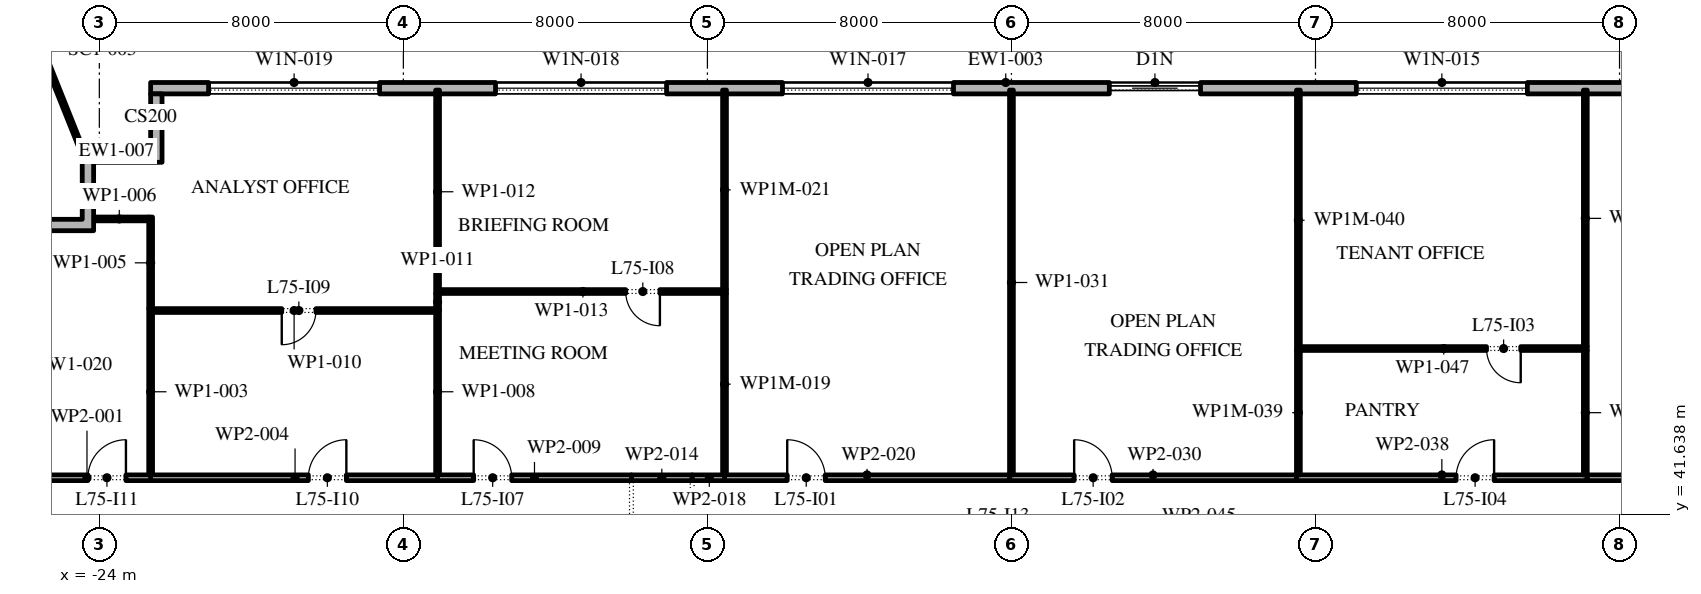
"""IFC4 building model, lengths in metres.
Left out: names, types, materials, properties, quantities, classifications, styles, units other than length and angle.
Written with IfcOpenShell. Run it as: python <this file> out.ifc"""

import sys

from ifc_helpers import new_model, si_unit, direction, frame, frame_2d, origin, place, context, subcontext, project, spatial, polyline, rectangle, outline, extrude, element, fill, save


model = new_model("IFC4")
c1 = context("Model", 3, precision=1e-05, world=origin(), true_north=direction((0.0, 1.0)))
c2 = subcontext(c1, "Body", "Model", "MODEL_VIEW")
j1 = project(units=[si_unit("LENGTHUNIT", "METRE"), si_unit("PLANEANGLEUNIT", "RADIAN")], contexts=[c1])
p1 = place(None, origin())
s1 = spatial("IfcSite", under=j1, at=p1, CompositionType="ELEMENT")
p2 = place(p1, origin())
s2 = spatial("IfcBuilding", under=s1, at=p2, CompositionType="ELEMENT")
p3 = place(p2, frame((0.0, 0.0, 342.6)))
s3 = spatial("IfcBuildingStorey", under=s2, at=p3, CompositionType="ELEMENT", Elevation=342.6)
p4 = place(p3, frame((22.35, 52.85, 0.0), z_axis=(0.0, 0.0, 1.0), x_axis=(-1.0, 0.0, 0.0)))
e1 = element("IfcWall", 1, at=p4, inside=s3, PredefinedType="STANDARD", context=c2, shape_type="SweptSolid", body=[
    extrude(rectangle(XDim=45.0, YDim=0.3, at=frame_2d((22.5, 0.0))), origin(), (0.0, 0.0, 1.0), 4.0),
])
p5 = place(p4, frame((1.375, 0.0, 0.45)))
e2 = element("IfcOpeningElement", 2, at=p5, cuts=e1, PredefinedType="OPENING", context=c2, shape_type="SweptSolid", body=[
    extrude(rectangle(XDim=4.5, YDim=2.525, at=frame_2d((2.25, 1.262))), frame((0.0, 0.16, 0.0), z_axis=(0.0, -1.0, 0.0), x_axis=(1.0, 0.0, 0.0)), (0.0, 0.0, 1.0), 0.32),
])
p6 = place(p4, frame((8.775, 0.0, 0.45)))
e3 = element("IfcOpeningElement", 3, at=p6, cuts=e1, PredefinedType="OPENING", context=c2, shape_type="SweptSolid", body=[
    extrude(rectangle(XDim=4.5, YDim=2.525, at=frame_2d((2.25, 1.262))), frame((0.0, 0.16, 0.0), z_axis=(0.0, -1.0, 0.0), x_axis=(1.0, 0.0, 0.0)), (0.0, 0.0, 1.0), 0.32),
])
p7 = place(p4, frame((17.375, 0.0, 0.0)))
e4 = element("IfcOpeningElement", 4, at=p7, cuts=e1, PredefinedType="OPENING", context=c2, shape_type="SweptSolid", body=[
    extrude(rectangle(XDim=2.4, YDim=2.975, at=frame_2d((1.2, 1.488))), frame((0.0, 0.16, 0.0), z_axis=(0.0, -1.0, 0.0), x_axis=(1.0, 0.0, 0.0)), (0.0, 0.0, 1.0), 0.32),
])
p8 = place(p4, frame((23.875, 0.0, 0.45)))
e5 = element("IfcOpeningElement", 5, at=p8, cuts=e1, PredefinedType="OPENING", context=c2, shape_type="SweptSolid", body=[
    extrude(rectangle(XDim=4.5, YDim=2.525, at=frame_2d((2.25, 1.262))), frame((0.0, 0.16, 0.0), z_axis=(0.0, -1.0, 0.0), x_axis=(1.0, 0.0, 0.0)), (0.0, 0.0, 1.0), 0.32),
])
p9 = place(p4, frame((31.425, 0.0, 0.45)))
e6 = element("IfcOpeningElement", 6, at=p9, cuts=e1, PredefinedType="OPENING", context=c2, shape_type="SweptSolid", body=[
    extrude(rectangle(XDim=4.5, YDim=2.525, at=frame_2d((2.25, 1.262))), frame((0.0, 0.16, 0.0), z_axis=(0.0, -1.0, 0.0), x_axis=(1.0, 0.0, 0.0)), (0.0, 0.0, 1.0), 0.32),
])
p10 = place(p4, frame((38.975, 0.0, 0.45)))
e7 = element("IfcOpeningElement", 7, at=p10, cuts=e1, PredefinedType="OPENING", context=c2, shape_type="SweptSolid", body=[
    extrude(rectangle(XDim=4.5, YDim=2.525, at=frame_2d((2.25, 1.262))), frame((0.0, 0.16, 0.0), z_axis=(0.0, -1.0, 0.0), x_axis=(1.0, 0.0, 0.0)), (0.0, 0.0, 1.0), 0.32),
])
p11 = place(p3, origin())
e8 = element("IfcWall", 8, at=p11, inside=s3, PredefinedType="STANDARD", context=c2, shape_type="SweptSolid", body=[
    extrude(outline(polyline([(-24.45, 49.4), (-24.45, 51.2), (-22.65, 51.2), (-22.65, 52.7), (-22.35, 52.7), (-22.35, 50.9), (-24.15, 50.9), (-24.15, 49.1), (-26.25, 49.1), (-26.25, 49.4), (-24.45, 49.4)])), origin(), (0.0, 0.0, 1.0), 4.0),
])
p12 = place(p3, frame((-24.45, 51.2, -0.05), z_axis=(0.0, 0.0, 1.0), x_axis=(-0.371412694589, 0.928467883288, 0.0)))
e9 = element("IfcWall", 9, at=p12, inside=s3, PredefinedType="STANDARD", context=c2, shape_type="SweptSolid", body=[
    extrude(rectangle(XDim=5.735, YDim=0.1, at=frame_2d((2.868, 0.0))), origin(), (0.0, 0.0, 1.0), 4.05),
])
p13 = place(p3, frame((-26.05, 42.6, 0.0), z_axis=(0.0, 0.0, 1.0), x_axis=(1.0, 0.0, 0.0)))
e10 = element("IfcWall", 10, at=p13, inside=s3, PredefinedType="PARTITIONING", context=c2, shape_type="SweptSolid", body=[
    extrude(rectangle(XDim=3.45, YDim=0.15, at=frame_2d((1.725, 0.0))), origin(), (0.0, 0.0, 1.0), 4.0),
])
p14 = place(p13, frame((1.75, 0.0, 0.0)))
e11 = element("IfcOpeningElement", 11, at=p14, cuts=e10, PredefinedType="OPENING", context=c2, shape_type="SweptSolid", body=[
    extrude(rectangle(XDim=1.0, YDim=2.1, at=frame_2d((0.5, 1.05))), frame((0.0, 0.085, 0.0), z_axis=(0.0, -1.0, 0.0), x_axis=(1.0, 0.0, 0.0)), (0.0, 0.0, 1.0), 0.17),
])
p15 = place(p3, frame((-22.65, 42.675, 0.0), z_axis=(0.0, 0.0, 1.0), x_axis=(0.0, 1.0, 0.0)))
e12 = element("IfcWall", 12, at=p15, inside=s3, PredefinedType="PARTITIONING", context=c2, shape_type="SweptSolid", body=[
    extrude(rectangle(XDim=4.375, YDim=0.1, at=frame_2d((2.188, 0.0))), origin(), (0.0, 0.0, 1.0), 4.0),
])
p16 = place(p3, frame((-22.65, 42.6, 0.0), z_axis=(0.0, 0.0, 1.0), x_axis=(1.0, 0.0, 0.0)))
e13 = element("IfcWall", 13, at=p16, inside=s3, PredefinedType="PARTITIONING", context=c2, shape_type="SweptSolid", body=[
    extrude(rectangle(XDim=7.6, YDim=0.15, at=frame_2d((3.8, 0.0))), origin(), (0.0, 0.0, 1.0), 4.0),
])
p17 = place(p16, frame((4.15, 0.0, 0.0)))
e14 = element("IfcOpeningElement", 14, at=p17, cuts=e13, PredefinedType="OPENING", context=c2, shape_type="SweptSolid", body=[
    extrude(rectangle(XDim=1.0, YDim=2.1, at=frame_2d((0.5, 1.05))), frame((0.0, 0.085, 0.0), z_axis=(0.0, -1.0, 0.0), x_axis=(1.0, 0.0, 0.0)), (0.0, 0.0, 1.0), 0.17),
])
p18 = place(p3, frame((-22.65, 47.05, 0.0), z_axis=(0.0, 0.0, 1.0), x_axis=(0.0, 1.0, 0.0)))
e15 = element("IfcWall", 15, at=p18, inside=s3, PredefinedType="PARTITIONING", context=c2, shape_type="SweptSolid", body=[
    extrude(rectangle(XDim=2.41, YDim=0.1, at=frame_2d((1.205, 0.0))), origin(), (0.0, 0.0, 1.0), 4.0),
])
p19 = place(p3, frame((-22.7, 49.41, 0.0), z_axis=(0.0, 0.0, 1.0), x_axis=(-1.0, 0.0, 0.0)))
e16 = element("IfcWall", 16, at=p19, inside=s3, PredefinedType="PARTITIONING", context=c2, shape_type="SweptSolid", body=[
    extrude(rectangle(XDim=1.55, YDim=0.1, at=frame_2d((0.775, 0.0))), origin(), (0.0, 0.0, 1.0), 4.0),
])
p20 = place(p3, frame((-15.1, 42.675, 0.0), z_axis=(0.0, 0.0, 1.0), x_axis=(0.0, 1.0, 0.0)))
e17 = element("IfcWall", 17, at=p20, inside=s3, PredefinedType="PARTITIONING", context=c2, shape_type="SweptSolid", body=[
    extrude(rectangle(XDim=4.375, YDim=0.1, at=frame_2d((2.188, 0.0))), origin(), (0.0, 0.0, 1.0), 4.0),
])
p21 = place(p3, frame((-15.1, 42.6, 0.0), z_axis=(0.0, 0.0, 1.0), x_axis=(1.0, 0.0, 0.0)))
e18 = element("IfcWall", 18, at=p21, inside=s3, PredefinedType="PARTITIONING", context=c2, shape_type="SweptSolid", body=[
    extrude(rectangle(XDim=5.1, YDim=0.15, at=frame_2d((2.55, 0.0))), origin(), (0.0, 0.0, 1.0), 4.0),
])
p22 = place(p21, frame((0.95, 0.0, 0.0)))
e19 = element("IfcOpeningElement", 19, at=p22, cuts=e18, PredefinedType="OPENING", context=c2, shape_type="SweptSolid", body=[
    extrude(rectangle(XDim=1.0, YDim=2.1, at=frame_2d((0.5, 1.05))), frame((0.0, 0.085, 0.0), z_axis=(0.0, -1.0, 0.0), x_axis=(1.0, 0.0, 0.0)), (0.0, 0.0, 1.0), 0.17),
])
p23 = place(p3, frame((-15.15, 47.0, 0.0), z_axis=(0.0, 0.0, 1.0), x_axis=(-1.0, 0.0, 0.0)))
e20 = element("IfcWall", 20, at=p23, inside=s3, PredefinedType="PARTITIONING", context=c2, shape_type="SweptSolid", body=[
    extrude(rectangle(XDim=7.45, YDim=0.1, at=frame_2d((3.725, 0.0))), origin(), (0.0, 0.0, 1.0), 4.0),
])
p24 = place(p23, frame((3.15, 0.0, 0.0)))
e21 = element("IfcOpeningElement", 21, at=p24, cuts=e20, PredefinedType="OPENING", context=c2, shape_type="SweptSolid", body=[
    extrude(rectangle(XDim=0.9, YDim=2.1, at=frame_2d((0.45, 1.05))), frame((0.0, 0.06, 0.0), z_axis=(0.0, -1.0, 0.0), x_axis=(1.0, 0.0, 0.0)), (0.0, 0.0, 1.0), 0.12),
])
p25 = place(p3, frame((-15.1, 47.0, 0.0), z_axis=(0.0, 0.0, 1.0), x_axis=(0.0, 1.0, 0.0)))
e22 = element("IfcWall", 22, at=p25, inside=s3, PredefinedType="PARTITIONING", context=c2, shape_type="SweptSolid", body=[
    extrude(rectangle(XDim=0.45, YDim=0.1, at=frame_2d((0.225, 0.0))), origin(), (0.0, 0.0, 1.0), 4.0),
])
p26 = place(p3, frame((-15.1, 47.45, 0.0), z_axis=(0.0, 0.0, 1.0), x_axis=(0.0, 1.0, 0.0)))
e23 = element("IfcWall", 23, at=p26, inside=s3, PredefinedType="PARTITIONING", context=c2, shape_type="SweptSolid", body=[
    extrude(rectangle(XDim=5.35, YDim=0.1, at=frame_2d((2.675, 0.0))), origin(), (0.0, 0.0, 1.0), 4.0),
])
p27 = place(p3, frame((-15.05, 47.5, 0.0), z_axis=(0.0, 0.0, 1.0), x_axis=(1.0, 0.0, 0.0)))
e24 = element("IfcWall", 24, at=p27, inside=s3, PredefinedType="PARTITIONING", context=c2, shape_type="SweptSolid", body=[
    extrude(rectangle(XDim=7.55, YDim=0.1, at=frame_2d((3.775, 0.0))), origin(), (0.0, 0.0, 1.0), 4.0),
])
p28 = place(p27, frame((4.9, 0.0, 0.0)))
e25 = element("IfcOpeningElement", 25, at=p28, cuts=e24, PredefinedType="OPENING", context=c2, shape_type="SweptSolid", body=[
    extrude(rectangle(XDim=0.9, YDim=2.1, at=frame_2d((0.45, 1.05))), frame((0.0, 0.06, 0.0), z_axis=(0.0, -1.0, 0.0), x_axis=(1.0, 0.0, 0.0)), (0.0, 0.0, 1.0), 0.12),
])
p29 = place(p3, frame((-10.0, 42.6, 0.0), z_axis=(0.0, 0.0, 1.0), x_axis=(1.0, 0.0, 0.0)))
e26 = element("IfcWall", 26, at=p29, inside=s3, PredefinedType="PARTITIONING", context=c2, shape_type="SweptSolid", body=[
    extrude(rectangle(XDim=1.6, YDim=0.15, at=frame_2d((0.8, 0.0))), origin(), (0.0, 0.0, 1.0), 4.0),
])
p30 = place(p3, frame((-8.4, 42.6, 0.0), z_axis=(0.0, 0.0, 1.0), x_axis=(1.0, 0.0, 0.0)))
e27 = element("IfcWall", 27, at=p30, inside=s3, PredefinedType="PARTITIONING", context=c2, shape_type="SweptSolid", body=[
    extrude(rectangle(XDim=0.9, YDim=0.15, at=frame_2d((0.45, 0.0))), origin(), (0.0, 0.0, 1.0), 4.0),
])
p31 = place(p3, frame((-7.55, 42.675, 0.0), z_axis=(0.0, 0.0, 1.0), x_axis=(0.0, 1.0, 0.0)))
e28 = element("IfcWall", 28, at=p31, inside=s3, PredefinedType="PARTITIONING", context=c2, shape_type="SweptSolid", body=[
    extrude(rectangle(XDim=4.775, YDim=0.1, at=frame_2d((2.387, 0.0))), origin(), (0.0, 0.0, 1.0), 3.096),
])
p32 = place(p3, frame((-7.55, 42.6, 0.0), z_axis=(0.0, 0.0, 1.0), x_axis=(1.0, 0.0, 0.0)))
e29 = element("IfcWall", 29, at=p32, inside=s3, PredefinedType="PARTITIONING", context=c2, shape_type="SweptSolid", body=[
    extrude(rectangle(XDim=7.5, YDim=0.15, at=frame_2d((3.75, 0.0))), origin(), (0.0, 0.0, 1.0), 4.0),
])
p33 = place(p32, frame((1.65, 0.0, 0.0)))
e30 = element("IfcOpeningElement", 30, at=p33, cuts=e29, PredefinedType="OPENING", context=c2, shape_type="SweptSolid", body=[
    extrude(rectangle(XDim=1.0, YDim=2.1, at=frame_2d((0.5, 1.05))), frame((0.0, 0.085, 0.0), z_axis=(0.0, -1.0, 0.0), x_axis=(1.0, 0.0, 0.0)), (0.0, 0.0, 1.0), 0.17),
])
p34 = place(p3, frame((-7.55, 47.55, 0.0), z_axis=(0.0, 0.0, 1.0), x_axis=(0.0, 1.0, 0.0)))
e31 = element("IfcWall", 31, at=p34, inside=s3, PredefinedType="PARTITIONING", context=c2, shape_type="SweptSolid", body=[
    extrude(rectangle(XDim=5.25, YDim=0.1, at=frame_2d((2.625, 0.0))), origin(), (0.0, 0.0, 1.0), 3.096),
])
p35 = place(p3, frame((-0.05, 42.6, 0.0), z_axis=(0.0, 0.0, 1.0), x_axis=(1.0, 0.0, 0.0)))
e32 = element("IfcWall", 32, at=p35, inside=s3, PredefinedType="PARTITIONING", context=c2, shape_type="SweptSolid", body=[
    extrude(rectangle(XDim=7.55, YDim=0.15, at=frame_2d((3.775, 0.0))), origin(), (0.0, 0.0, 1.0), 4.0),
])
p36 = place(p35, frame((1.7, 0.0, 0.0)))
e33 = element("IfcOpeningElement", 33, at=p36, cuts=e32, PredefinedType="OPENING", context=c2, shape_type="SweptSolid", body=[
    extrude(rectangle(XDim=1.0, YDim=2.1, at=frame_2d((0.5, 1.05))), frame((0.0, 0.085, 0.0), z_axis=(0.0, -1.0, 0.0), x_axis=(1.0, 0.0, 0.0)), (0.0, 0.0, 1.0), 0.17),
])
p37 = place(p3, frame((0.0, 52.8, 0.0), z_axis=(0.0, 0.0, 1.0), x_axis=(0.0, -1.0, 0.0)))
e34 = element("IfcWall", 34, at=p37, inside=s3, PredefinedType="PARTITIONING", context=c2, shape_type="SweptSolid", body=[
    extrude(rectangle(XDim=10.125, YDim=0.1, at=frame_2d((5.062, 0.0))), origin(), (0.0, 0.0, 1.0), 4.0),
])
p38 = place(p3, frame((7.5, 42.6, 0.0), z_axis=(0.0, 0.0, 1.0), x_axis=(1.0, 0.0, 0.0)))
e35 = element("IfcWall", 35, at=p38, inside=s3, PredefinedType="PARTITIONING", context=c2, shape_type="SweptSolid", body=[
    extrude(rectangle(XDim=7.65, YDim=0.15, at=frame_2d((3.825, 0.0))), origin(), (0.0, 0.0, 1.0), 4.0),
])
p39 = place(p38, frame((4.2, 0.0, 0.0)))
e36 = element("IfcOpeningElement", 36, at=p39, cuts=e35, PredefinedType="OPENING", context=c2, shape_type="SweptSolid", body=[
    extrude(rectangle(XDim=1.0, YDim=2.1, at=frame_2d((0.5, 1.05))), frame((0.0, 0.085, 0.0), z_axis=(0.0, -1.0, 0.0), x_axis=(1.0, 0.0, 0.0)), (0.0, 0.0, 1.0), 0.17),
])
p40 = place(p3, frame((7.55, 45.95, 0.0), z_axis=(0.0, 0.0, 1.0), x_axis=(0.0, -1.0, 0.0)))
e37 = element("IfcWall", 37, at=p40, inside=s3, PredefinedType="PARTITIONING", context=c2, shape_type="SweptSolid", body=[
    extrude(rectangle(XDim=3.275, YDim=0.1, at=frame_2d((1.637, 0.0))), origin(), (0.0, 0.0, 1.0), 3.096),
])
p41 = place(p3, frame((7.55, 52.8, 0.0), z_axis=(0.0, 0.0, 1.0), x_axis=(0.0, -1.0, 0.0)))
e38 = element("IfcWall", 38, at=p41, inside=s3, PredefinedType="PARTITIONING", context=c2, shape_type="SweptSolid", body=[
    extrude(rectangle(XDim=6.85, YDim=0.1, at=frame_2d((3.425, 0.0))), origin(), (0.0, 0.0, 1.0), 3.096),
])
p42 = place(p3, frame((15.15, 42.6, 0.0), z_axis=(0.0, 0.0, 1.0), x_axis=(1.0, 0.0, 0.0)))
e39 = element("IfcWall", 39, at=p42, inside=s3, PredefinedType="PARTITIONING", context=c2, shape_type="SweptSolid", body=[
    extrude(rectangle(XDim=7.55, YDim=0.15, at=frame_2d((3.775, 0.0))), origin(), (0.0, 0.0, 1.0), 4.0),
])
p43 = place(p42, frame((1.6, 0.0, 0.0)))
e40 = element("IfcOpeningElement", 40, at=p43, cuts=e39, PredefinedType="OPENING", context=c2, shape_type="SweptSolid", body=[
    extrude(rectangle(XDim=1.0, YDim=2.1, at=frame_2d((0.5, 1.05))), frame((0.0, 0.085, 0.0), z_axis=(0.0, -1.0, 0.0), x_axis=(1.0, 0.0, 0.0)), (0.0, 0.0, 1.0), 0.17),
])
p44 = place(p3, frame((15.15, 46.0, 0.0), z_axis=(0.0, 0.0, 1.0), x_axis=(-1.0, 0.0, 0.0)))
e41 = element("IfcWall", 41, at=p44, inside=s3, PredefinedType="PARTITIONING", context=c2, shape_type="SweptSolid", body=[
    extrude(rectangle(XDim=7.55, YDim=0.1, at=frame_2d((3.775, 0.0))), origin(), (0.0, 0.0, 1.0), 4.0),
])
p45 = place(p44, frame((1.75, 0.0, 0.0)))
e42 = element("IfcOpeningElement", 42, at=p45, cuts=e41, PredefinedType="OPENING", context=c2, shape_type="SweptSolid", body=[
    extrude(rectangle(XDim=0.9, YDim=2.1, at=frame_2d((0.45, 1.05))), frame((0.0, 0.06, 0.0), z_axis=(0.0, -1.0, 0.0), x_axis=(1.0, 0.0, 0.0)), (0.0, 0.0, 1.0), 0.12),
])
p46 = place(p3, frame((15.1, 45.95, 0.0), z_axis=(0.0, 0.0, 1.0), x_axis=(0.0, -1.0, 0.0)))
e43 = element("IfcWall", 43, at=p46, inside=s3, PredefinedType="PARTITIONING", context=c2, shape_type="SweptSolid", body=[
    extrude(rectangle(XDim=3.275, YDim=0.1, at=frame_2d((1.637, 0.0))), origin(), (0.0, 0.0, 1.0), 4.0),
])
p47 = place(p3, frame((15.1, 52.8, 0.0), z_axis=(0.0, 0.0, 1.0), x_axis=(0.0, -1.0, 0.0)))
e44 = element("IfcWall", 44, at=p47, inside=s3, PredefinedType="PARTITIONING", context=c2, shape_type="SweptSolid", body=[
    extrude(rectangle(XDim=6.75, YDim=0.1, at=frame_2d((3.375, 0.0))), origin(), (0.0, 0.0, 1.0), 4.0),
])
p48 = place(p6, origin())
e45 = element("IfcWindow", 45, at=p48, inside=s3, PartitioningType="DOUBLE_PANEL_VERTICAL", PredefinedType="WINDOW", context=c2, shape_type="SweptSolid", body=[
    extrude(rectangle(XDim=4.5, YDim=2.525, at=frame_2d((2.25, 1.262))), frame((0.0, 0.03, 0.0), z_axis=(0.0, -1.0, 0.0), x_axis=(1.0, 0.0, 0.0)), (0.0, 0.0, 1.0), 0.06),
])
fill(e3, e45)
p49 = place(p7, origin())
e46 = element("IfcDoor", 46, at=p49, inside=s3, OperationType="DOUBLE_DOOR_SLIDING", PredefinedType="DOOR", context=c2, shape_type="SweptSolid", body=[
    extrude(rectangle(XDim=2.4, YDim=2.975, at=frame_2d((1.2, 1.488))), frame((0.0, 0.025, 0.0), z_axis=(0.0, -1.0, 0.0), x_axis=(1.0, 0.0, 0.0)), (0.0, 0.0, 1.0), 0.05),
])
fill(e4, e46)
p50 = place(p8, origin())
e47 = element("IfcWindow", 47, at=p50, inside=s3, PartitioningType="DOUBLE_PANEL_VERTICAL", PredefinedType="WINDOW", context=c2, shape_type="SweptSolid", body=[
    extrude(rectangle(XDim=4.5, YDim=2.525, at=frame_2d((2.25, 1.262))), frame((0.0, 0.03, 0.0), z_axis=(0.0, -1.0, 0.0), x_axis=(1.0, 0.0, 0.0)), (0.0, 0.0, 1.0), 0.06),
])
fill(e5, e47)
p51 = place(p9, origin())
e48 = element("IfcWindow", 48, at=p51, inside=s3, PartitioningType="DOUBLE_PANEL_VERTICAL", PredefinedType="WINDOW", context=c2, shape_type="SweptSolid", body=[
    extrude(rectangle(XDim=4.5, YDim=2.525, at=frame_2d((2.25, 1.262))), frame((0.0, 0.03, 0.0), z_axis=(0.0, -1.0, 0.0), x_axis=(1.0, 0.0, 0.0)), (0.0, 0.0, 1.0), 0.06),
])
fill(e6, e48)
p52 = place(p10, origin())
e49 = element("IfcWindow", 49, at=p52, inside=s3, PartitioningType="DOUBLE_PANEL_VERTICAL", PredefinedType="WINDOW", context=c2, shape_type="SweptSolid", body=[
    extrude(rectangle(XDim=4.5, YDim=2.525, at=frame_2d((2.25, 1.262))), frame((0.0, 0.03, 0.0), z_axis=(0.0, -1.0, 0.0), x_axis=(1.0, 0.0, 0.0)), (0.0, 0.0, 1.0), 0.06),
])
fill(e7, e49)
p53 = place(p33, origin())
e50 = element("IfcDoor", 50, at=p53, inside=s3, OperationType="SINGLE_SWING_RIGHT", PredefinedType="DOOR", context=c2, shape_type="SweptSolid", body=[
    extrude(rectangle(XDim=1.0, YDim=2.1, at=frame_2d((0.5, 1.05))), frame((0.0, 0.025, 0.0), z_axis=(0.0, -1.0, 0.0), x_axis=(1.0, 0.0, 0.0)), (0.0, 0.0, 1.0), 0.05),
])
fill(e30, e50)
p54 = place(p36, origin())
e51 = element("IfcDoor", 51, at=p54, inside=s3, OperationType="SINGLE_SWING_RIGHT", PredefinedType="DOOR", context=c2, shape_type="SweptSolid", body=[
    extrude(rectangle(XDim=1.0, YDim=2.1, at=frame_2d((0.5, 1.05))), frame((0.0, 0.025, 0.0), z_axis=(0.0, -1.0, 0.0), x_axis=(1.0, 0.0, 0.0)), (0.0, 0.0, 1.0), 0.05),
])
fill(e33, e51)
p55 = place(p45, origin())
e52 = element("IfcDoor", 52, at=p55, inside=s3, OperationType="SINGLE_SWING_RIGHT", PredefinedType="DOOR", context=c2, shape_type="SweptSolid", body=[
    extrude(rectangle(XDim=0.9, YDim=2.1, at=frame_2d((0.45, 1.05))), frame((0.0, 0.025, 0.0), z_axis=(0.0, -1.0, 0.0), x_axis=(1.0, 0.0, 0.0)), (0.0, 0.0, 1.0), 0.05),
])
fill(e42, e52)
p56 = place(p39, origin())
e53 = element("IfcDoor", 53, at=p56, inside=s3, OperationType="SINGLE_SWING_LEFT", PredefinedType="DOOR", context=c2, shape_type="SweptSolid", body=[
    extrude(rectangle(XDim=1.0, YDim=2.1, at=frame_2d((0.5, 1.05))), frame((0.0, 0.025, 0.0), z_axis=(0.0, -1.0, 0.0), x_axis=(1.0, 0.0, 0.0)), (0.0, 0.0, 1.0), 0.05),
])
fill(e36, e53)
p57 = place(p22, origin())
e54 = element("IfcDoor", 54, at=p57, inside=s3, OperationType="SINGLE_SWING_RIGHT", PredefinedType="DOOR", context=c2, shape_type="SweptSolid", body=[
    extrude(rectangle(XDim=1.0, YDim=2.1, at=frame_2d((0.5, 1.05))), frame((0.0, 0.025, 0.0), z_axis=(0.0, -1.0, 0.0), x_axis=(1.0, 0.0, 0.0)), (0.0, 0.0, 1.0), 0.05),
])
fill(e19, e54)
p58 = place(p28, frame((0.9, 0.0, 0.0), z_axis=(0.0, 0.0, 1.0), x_axis=(-1.0, 0.0, 0.0)))
e55 = element("IfcDoor", 55, at=p58, inside=s3, OperationType="SINGLE_SWING_RIGHT", PredefinedType="DOOR", context=c2, shape_type="SweptSolid", body=[
    extrude(rectangle(XDim=0.9, YDim=2.1, at=frame_2d((0.45, 1.05))), frame((0.0, 0.025, 0.0), z_axis=(0.0, -1.0, 0.0), x_axis=(1.0, 0.0, 0.0)), (0.0, 0.0, 1.0), 0.05),
])
fill(e25, e55)
p59 = place(p24, origin())
e56 = element("IfcDoor", 56, at=p59, inside=s3, OperationType="SINGLE_SWING_LEFT", PredefinedType="DOOR", context=c2, shape_type="SweptSolid", body=[
    extrude(rectangle(XDim=0.9, YDim=2.1, at=frame_2d((0.45, 1.05))), frame((0.0, 0.025, 0.0), z_axis=(0.0, -1.0, 0.0), x_axis=(1.0, 0.0, 0.0)), (0.0, 0.0, 1.0), 0.05),
])
fill(e21, e56)
p60 = place(p17, origin())
e57 = element("IfcDoor", 57, at=p60, inside=s3, OperationType="SINGLE_SWING_LEFT", PredefinedType="DOOR", context=c2, shape_type="SweptSolid", body=[
    extrude(rectangle(XDim=1.0, YDim=2.1, at=frame_2d((0.5, 1.05))), frame((0.0, 0.025, 0.0), z_axis=(0.0, -1.0, 0.0), x_axis=(1.0, 0.0, 0.0)), (0.0, 0.0, 1.0), 0.05),
])
fill(e14, e57)
p61 = place(p14, origin())
e58 = element("IfcDoor", 58, at=p61, inside=s3, OperationType="SINGLE_SWING_LEFT", PredefinedType="DOOR", context=c2, shape_type="SweptSolid", body=[
    extrude(rectangle(XDim=1.0, YDim=2.1, at=frame_2d((0.5, 1.05))), frame((0.0, 0.025, 0.0), z_axis=(0.0, -1.0, 0.0), x_axis=(1.0, 0.0, 0.0)), (0.0, 0.0, 1.0), 0.05),
])
fill(e11, e58)
save(model, sys.argv[1])
